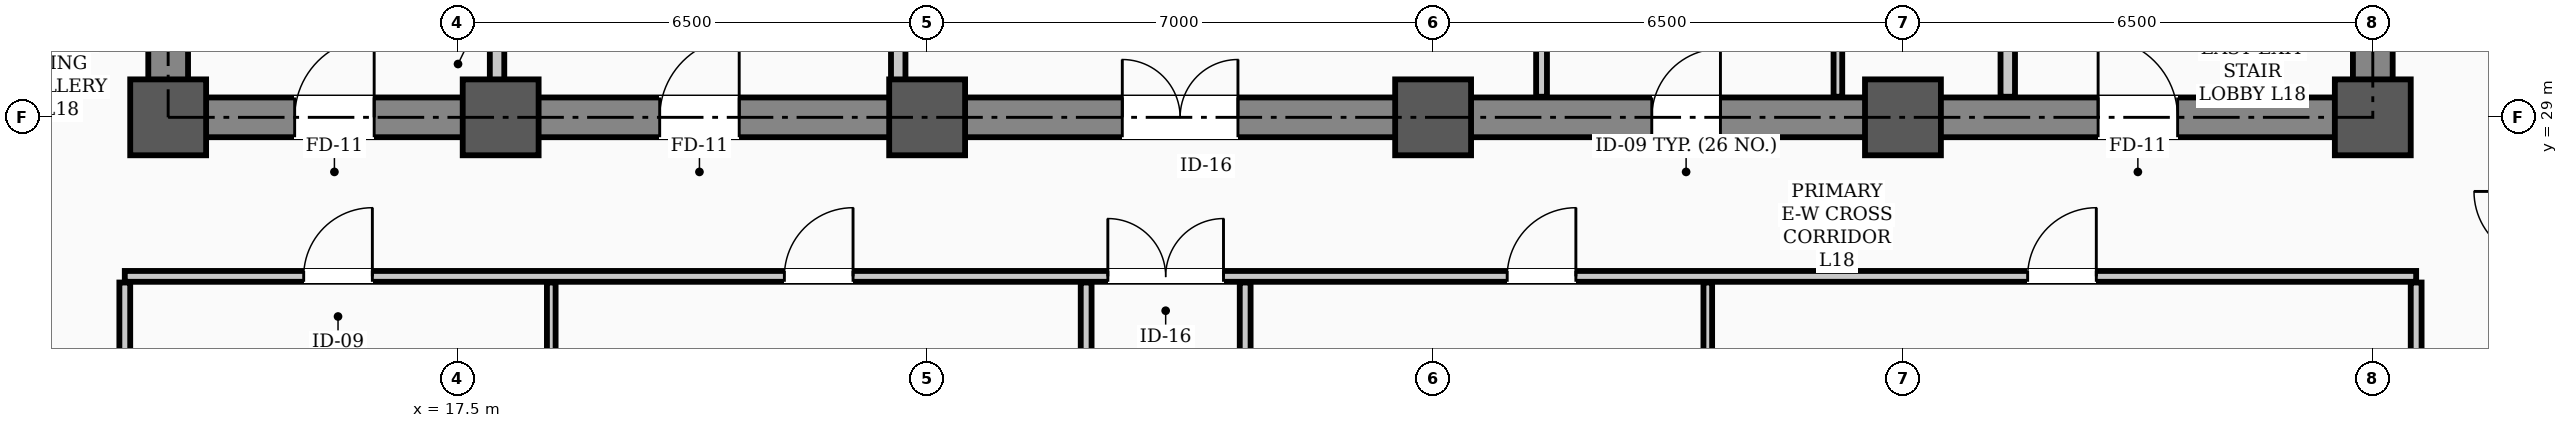
"""IFC4 building model, lengths in metres.
Left out: names, types, materials, properties, quantities, classifications, styles, units other than length and angle.
Written with IfcOpenShell. Run it as: python <this file> out.ifc"""

import sys

from ifc_helpers import new_model, si_unit, direction, frame, frame_2d, origin, origin_2d, place, context, subcontext, project, spatial, rectangle, hollow_rectangle, extrude, element, fill, save


model = new_model("IFC4")
c1 = context("Model", 3, precision=1e-05, world=origin(), true_north=direction((0.0, 1.0)))
c2 = subcontext(c1, "Body", "Model", "MODEL_VIEW")
j1 = project(units=[si_unit("LENGTHUNIT", "METRE"), si_unit("PLANEANGLEUNIT", "RADIAN")], contexts=[c1])
p1 = place(None, origin())
s1 = spatial("IfcSite", under=j1, at=p1, CompositionType="ELEMENT")
p2 = place(p1, origin())
s2 = spatial("IfcBuilding", under=s1, at=p2, CompositionType="ELEMENT")
p3 = place(p2, frame((0.0, 0.0, 73.3)))
s3 = spatial("IfcBuildingStorey", under=s2, at=p3, CompositionType="ELEMENT", Elevation=73.3)
for number, where, z_axis, x_axis in (
    (1, (13.5, 29.0, 0.0), (0.0, 0.0, 1.0), (1.0, 0.0, 0.0)),
    (2, (18.1, 29.0, 0.0), (0.0, 0.0, 1.0), (1.0, 0.0, 0.0)),
    (3, (24.0, 29.0, 0.0), (0.0, 0.0, 1.0), (1.0, 0.0, 0.0)),
    (4, (31.0, 29.0, 0.0), (0.0, 0.0, 1.0), (1.0, 0.0, 0.0)),
    (5, (37.5, 29.0, 0.0), (0.0, 0.0, 1.0), (1.0, 0.0, 0.0)),
    (6, (44.0, 29.0, 0.0), (0.0, 0.0, 1.0), (1.0, 0.0, 0.0)),
):
    element("IfcColumn", number, at=place(p3, frame(where, z_axis=z_axis, x_axis=x_axis)), inside=s3, PredefinedType="COLUMN", context=c2, shape_type="SweptSolid", body=[
        extrude(hollow_rectangle(XDim=1.05, YDim=1.05, WallThickness=0.038, InnerFilletRadius=0.019, OuterFilletRadius=0.057, at=origin_2d()), origin(), (0.0, 0.0, 1.0), 3.9),
    ])
p4 = place(p3, frame((13.5, 29.0, 0.0), z_axis=(0.0, 0.0, 1.0), x_axis=(1.0, 0.0, 0.0)))
e7 = element("IfcWall", 7, at=p4, inside=s3, PredefinedType="SHEAR", context=c2, shape_type="SweptSolid", body=[
    extrude(rectangle(XDim=30.5, YDim=0.55, at=frame_2d((15.25, 0.0))), origin(), (0.0, 0.0, 1.0), 3.72),
])
p5 = place(p4, frame((1.75, 0.0, 0.0)))
e8 = element("IfcOpeningElement", 8, at=p5, cuts=e7, PredefinedType="OPENING", context=c2, shape_type="SweptSolid", body=[
    extrude(rectangle(XDim=1.1, YDim=2.08, at=frame_2d((0.55, 1.04))), frame((0.0, 0.285, 0.0), z_axis=(0.0, -1.0, 0.0), x_axis=(1.0, 0.0, 0.0)), (0.0, 0.0, 1.0), 0.57),
])
p6 = place(p4, frame((26.7, 0.0, 0.0)))
e9 = element("IfcOpeningElement", 9, at=p6, cuts=e7, PredefinedType="OPENING", context=c2, shape_type="SweptSolid", body=[
    extrude(rectangle(XDim=1.1, YDim=2.08, at=frame_2d((0.55, 1.04))), frame((0.0, 0.285, 0.0), z_axis=(0.0, -1.0, 0.0), x_axis=(1.0, 0.0, 0.0)), (0.0, 0.0, 1.0), 0.57),
])
p7 = place(p4, frame((6.8, 0.0, 0.0)))
e10 = element("IfcOpeningElement", 10, at=p7, cuts=e7, PredefinedType="OPENING", context=c2, shape_type="SweptSolid", body=[
    extrude(rectangle(XDim=1.1, YDim=2.08, at=frame_2d((0.55, 1.04))), frame((0.0, 0.285, 0.0), z_axis=(0.0, -1.0, 0.0), x_axis=(1.0, 0.0, 0.0)), (0.0, 0.0, 1.0), 0.57),
])
p8 = place(p4, frame((13.2, 0.0, 0.0)))
e11 = element("IfcOpeningElement", 11, at=p8, cuts=e7, PredefinedType="OPENING", context=c2, shape_type="SweptSolid", body=[
    extrude(rectangle(XDim=1.6, YDim=2.08, at=frame_2d((0.8, 1.04))), frame((0.0, 0.285, 0.0), z_axis=(0.0, -1.0, 0.0), x_axis=(1.0, 0.0, 0.0)), (0.0, 0.0, 1.0), 0.57),
])
p9 = place(p4, frame((20.525, 0.0, 0.0)))
e12 = element("IfcOpeningElement", 12, at=p9, cuts=e7, PredefinedType="OPENING", context=c2, shape_type="SweptSolid", body=[
    extrude(rectangle(XDim=0.95, YDim=2.08, at=frame_2d((0.475, 1.04))), frame((0.0, 0.285, 0.0), z_axis=(0.0, -1.0, 0.0), x_axis=(1.0, 0.0, 0.0)), (0.0, 0.0, 1.0), 0.57),
])
for number, where, z_axis, x_axis in (
    (13, (13.5, 29.35, 0.0), (0.0, 0.0, 1.0), (0.0, 1.0, 0.0)),
    (14, (44.0, 29.35, 0.0), (0.0, 0.0, 1.0), (0.0, 1.0, 0.0)),
):
    element("IfcWall", number, at=place(p3, frame(where, z_axis=z_axis, x_axis=x_axis)), inside=s3, PredefinedType="SHEAR", context=c2, shape_type="SweptSolid", body=[
        extrude(rectangle(XDim=8.6, YDim=0.55, at=frame_2d((4.3, 0.0))), origin(), (0.0, 0.0, 1.0), 3.72),
    ])
p10 = place(p3, frame((12.9, 26.8, 0.0), z_axis=(0.0, 0.0, 1.0), x_axis=(1.0, 0.0, 0.0)))
e15 = element("IfcWall", 15, at=p10, inside=s3, PredefinedType="PARTITIONING", context=c2, shape_type="SweptSolid", body=[
    extrude(rectangle(XDim=31.7, YDim=0.15, at=frame_2d((15.85, 0.0))), origin(), (0.0, 0.0, 1.0), 3.1),
])
p11 = place(p10, frame((13.6, 0.0, 0.0)))
e16 = element("IfcOpeningElement", 16, at=p11, cuts=e15, PredefinedType="OPENING", context=c2, shape_type="SweptSolid", body=[
    extrude(rectangle(XDim=1.6, YDim=2.08, at=frame_2d((0.8, 1.04))), frame((0.0, 0.085, 0.0), z_axis=(0.0, -1.0, 0.0), x_axis=(1.0, 0.0, 0.0)), (0.0, 0.0, 1.0), 0.17),
])
p12 = place(p10, frame((2.475, 0.0, 0.0)))
e17 = element("IfcOpeningElement", 17, at=p12, cuts=e15, PredefinedType="OPENING", context=c2, shape_type="SweptSolid", body=[
    extrude(rectangle(XDim=0.95, YDim=2.08, at=frame_2d((0.475, 1.04))), frame((0.0, 0.085, 0.0), z_axis=(0.0, -1.0, 0.0), x_axis=(1.0, 0.0, 0.0)), (0.0, 0.0, 1.0), 0.17),
])
p13 = place(p10, frame((9.125, 0.0, 0.0)))
e18 = element("IfcOpeningElement", 18, at=p13, cuts=e15, PredefinedType="OPENING", context=c2, shape_type="SweptSolid", body=[
    extrude(rectangle(XDim=0.95, YDim=2.08, at=frame_2d((0.475, 1.04))), frame((0.0, 0.085, 0.0), z_axis=(0.0, -1.0, 0.0), x_axis=(1.0, 0.0, 0.0)), (0.0, 0.0, 1.0), 0.17),
])
p14 = place(p10, frame((19.125, 0.0, 0.0)))
e19 = element("IfcOpeningElement", 19, at=p14, cuts=e15, PredefinedType="OPENING", context=c2, shape_type="SweptSolid", body=[
    extrude(rectangle(XDim=0.95, YDim=2.08, at=frame_2d((0.475, 1.04))), frame((0.0, 0.085, 0.0), z_axis=(0.0, -1.0, 0.0), x_axis=(1.0, 0.0, 0.0)), (0.0, 0.0, 1.0), 0.17),
])
p15 = place(p10, frame((26.325, 0.0, 0.0)))
e20 = element("IfcOpeningElement", 20, at=p15, cuts=e15, PredefinedType="OPENING", context=c2, shape_type="SweptSolid", body=[
    extrude(rectangle(XDim=0.95, YDim=2.08, at=frame_2d((0.475, 1.04))), frame((0.0, 0.085, 0.0), z_axis=(0.0, -1.0, 0.0), x_axis=(1.0, 0.0, 0.0)), (0.0, 0.0, 1.0), 0.17),
])
for number, where, z_axis, x_axis in (
    (21, (18.05, 29.285, 0.0), (0.0, 0.0, 1.0), (0.0, 1.0, 0.0)),
    (22, (38.95, 29.285, 0.0), (0.0, 0.0, 1.0), (0.0, 1.0, 0.0)),
):
    element("IfcWall", number, at=place(p3, frame(where, z_axis=z_axis, x_axis=x_axis)), inside=s3, PredefinedType="STANDARD", context=c2, shape_type="SweptSolid", body=[
        extrude(rectangle(XDim=1.015, YDim=0.2, at=frame_2d((0.508, 0.0))), origin(), (0.0, 0.0, 1.0), 3.3),
    ])
p16 = place(p3, frame((23.6, 29.285, 0.0), z_axis=(0.0, 0.0, 1.0), x_axis=(0.0, 1.0, 0.0)))
e23 = element("IfcWall", 23, at=p16, inside=s3, PredefinedType="STANDARD", context=c2, shape_type="SweptSolid", body=[
    extrude(rectangle(XDim=5.415, YDim=0.2, at=frame_2d((2.708, 0.0))), origin(), (0.0, 0.0, 1.0), 3.1),
])
p17 = place(p3, frame((32.5, 29.285, 0.0), z_axis=(0.0, 0.0, 1.0), x_axis=(0.0, 1.0, 0.0)))
e24 = element("IfcWall", 24, at=p17, inside=s3, PredefinedType="PARTITIONING", context=c2, shape_type="SweptSolid", body=[
    extrude(rectangle(XDim=2.48, YDim=0.15, at=frame_2d((1.24, 0.0))), origin(), (0.0, 0.0, 1.0), 3.3),
])
p18 = place(p3, frame((36.6, 29.285, 0.0), z_axis=(0.0, 0.0, 1.0), x_axis=(0.0, 1.0, 0.0)))
e25 = element("IfcWall", 25, at=p18, inside=s3, PredefinedType="PARTITIONING", context=c2, shape_type="SweptSolid", body=[
    extrude(rectangle(XDim=2.48, YDim=0.12, at=frame_2d((1.24, 0.0))), origin(), (0.0, 0.0, 1.0), 3.3),
])
for number, where, z_axis, x_axis in (
    (26, (26.2, 19.335, 0.0), (0.0, 0.0, 1.0), (0.0, 1.0, 0.0)),
    (27, (28.4, 19.335, 0.0), (0.0, 0.0, 1.0), (0.0, 1.0, 0.0)),
    (28, (12.9, 19.335, 0.0), (0.0, 0.0, 1.0), (0.0, 1.0, 0.0)),
    (29, (44.6, 19.335, 0.0), (0.0, 0.0, 1.0), (0.0, 1.0, 0.0)),
):
    element("IfcWall", number, at=place(p3, frame(where, z_axis=z_axis, x_axis=x_axis)), inside=s3, PredefinedType="PARTITIONING", context=c2, shape_type="SweptSolid", body=[
        extrude(rectangle(XDim=7.38, YDim=0.15, at=frame_2d((3.69, 0.0))), origin(), (0.0, 0.0, 1.0), 3.0),
    ])
for number, where, z_axis, x_axis in (
    (30, (18.8, 19.335, 0.0), (0.0, 0.0, 1.0), (0.0, 1.0, 0.0)),
    (31, (34.8, 19.335, 0.0), (0.0, 0.0, 1.0), (0.0, 1.0, 0.0)),
):
    element("IfcWall", number, at=place(p3, frame(where, z_axis=z_axis, x_axis=x_axis)), inside=s3, PredefinedType="PARTITIONING", context=c2, shape_type="SweptSolid", body=[
        extrude(rectangle(XDim=7.38, YDim=0.12, at=frame_2d((3.69, 0.0))), origin(), (0.0, 0.0, 1.0), 3.0),
    ])
p19 = place(p5, origin())
e32 = element("IfcDoor", 32, at=p19, inside=s3, OperationType="SINGLE_SWING_RIGHT", PredefinedType="DOOR", context=c2, shape_type="SweptSolid", body=[
    extrude(rectangle(XDim=1.1, YDim=2.08, at=frame_2d((0.55, 1.04))), frame((0.0, 0.025, 0.0), z_axis=(0.0, -1.0, 0.0), x_axis=(1.0, 0.0, 0.0)), (0.0, 0.0, 1.0), 0.05),
])
fill(e8, e32)
p20 = place(p6, origin())
e33 = element("IfcDoor", 33, at=p20, inside=s3, OperationType="SINGLE_SWING_LEFT", PredefinedType="DOOR", context=c2, shape_type="SweptSolid", body=[
    extrude(rectangle(XDim=1.1, YDim=2.08, at=frame_2d((0.55, 1.04))), frame((0.0, 0.025, 0.0), z_axis=(0.0, -1.0, 0.0), x_axis=(1.0, 0.0, 0.0)), (0.0, 0.0, 1.0), 0.05),
])
fill(e9, e33)
p21 = place(p7, origin())
e34 = element("IfcDoor", 34, at=p21, inside=s3, OperationType="SINGLE_SWING_RIGHT", PredefinedType="DOOR", context=c2, shape_type="SweptSolid", body=[
    extrude(rectangle(XDim=1.1, YDim=2.08, at=frame_2d((0.55, 1.04))), frame((0.0, 0.025, 0.0), z_axis=(0.0, -1.0, 0.0), x_axis=(1.0, 0.0, 0.0)), (0.0, 0.0, 1.0), 0.05),
])
fill(e10, e34)
p22 = place(p8, origin())
e35 = element("IfcDoor", 35, at=p22, inside=s3, OperationType="DOUBLE_DOOR_SINGLE_SWING", PredefinedType="DOOR", context=c2, shape_type="SweptSolid", body=[
    extrude(rectangle(XDim=1.6, YDim=2.08, at=frame_2d((0.8, 1.04))), frame((0.0, 0.025, 0.0), z_axis=(0.0, -1.0, 0.0), x_axis=(1.0, 0.0, 0.0)), (0.0, 0.0, 1.0), 0.05),
])
fill(e11, e35)
p23 = place(p9, origin())
e36 = element("IfcDoor", 36, at=p23, inside=s3, OperationType="SINGLE_SWING_RIGHT", PredefinedType="DOOR", context=c2, shape_type="SweptSolid", body=[
    extrude(rectangle(XDim=0.95, YDim=2.08, at=frame_2d((0.475, 1.04))), frame((0.0, 0.025, 0.0), z_axis=(0.0, -1.0, 0.0), x_axis=(1.0, 0.0, 0.0)), (0.0, 0.0, 1.0), 0.05),
])
fill(e12, e36)
p24 = place(p11, origin())
e37 = element("IfcDoor", 37, at=p24, inside=s3, OperationType="DOUBLE_DOOR_SINGLE_SWING", PredefinedType="DOOR", context=c2, shape_type="SweptSolid", body=[
    extrude(rectangle(XDim=1.6, YDim=2.08, at=frame_2d((0.8, 1.04))), frame((0.0, 0.025, 0.0), z_axis=(0.0, -1.0, 0.0), x_axis=(1.0, 0.0, 0.0)), (0.0, 0.0, 1.0), 0.05),
])
fill(e16, e37)
p25 = place(p12, origin())
e38 = element("IfcDoor", 38, at=p25, inside=s3, OperationType="SINGLE_SWING_RIGHT", PredefinedType="DOOR", context=c2, shape_type="SweptSolid", body=[
    extrude(rectangle(XDim=0.95, YDim=2.08, at=frame_2d((0.475, 1.04))), frame((0.0, 0.025, 0.0), z_axis=(0.0, -1.0, 0.0), x_axis=(1.0, 0.0, 0.0)), (0.0, 0.0, 1.0), 0.05),
])
fill(e17, e38)
p26 = place(p13, origin())
e39 = element("IfcDoor", 39, at=p26, inside=s3, OperationType="SINGLE_SWING_RIGHT", PredefinedType="DOOR", context=c2, shape_type="SweptSolid", body=[
    extrude(rectangle(XDim=0.95, YDim=2.08, at=frame_2d((0.475, 1.04))), frame((0.0, 0.025, 0.0), z_axis=(0.0, -1.0, 0.0), x_axis=(1.0, 0.0, 0.0)), (0.0, 0.0, 1.0), 0.05),
])
fill(e18, e39)
p27 = place(p14, origin())
e40 = element("IfcDoor", 40, at=p27, inside=s3, OperationType="SINGLE_SWING_RIGHT", PredefinedType="DOOR", context=c2, shape_type="SweptSolid", body=[
    extrude(rectangle(XDim=0.95, YDim=2.08, at=frame_2d((0.475, 1.04))), frame((0.0, 0.025, 0.0), z_axis=(0.0, -1.0, 0.0), x_axis=(1.0, 0.0, 0.0)), (0.0, 0.0, 1.0), 0.05),
])
fill(e19, e40)
p28 = place(p15, origin())
e41 = element("IfcDoor", 41, at=p28, inside=s3, OperationType="SINGLE_SWING_RIGHT", PredefinedType="DOOR", context=c2, shape_type="SweptSolid", body=[
    extrude(rectangle(XDim=0.95, YDim=2.08, at=frame_2d((0.475, 1.04))), frame((0.0, 0.025, 0.0), z_axis=(0.0, -1.0, 0.0), x_axis=(1.0, 0.0, 0.0)), (0.0, 0.0, 1.0), 0.05),
])
fill(e20, e41)
save(model, sys.argv[1])
